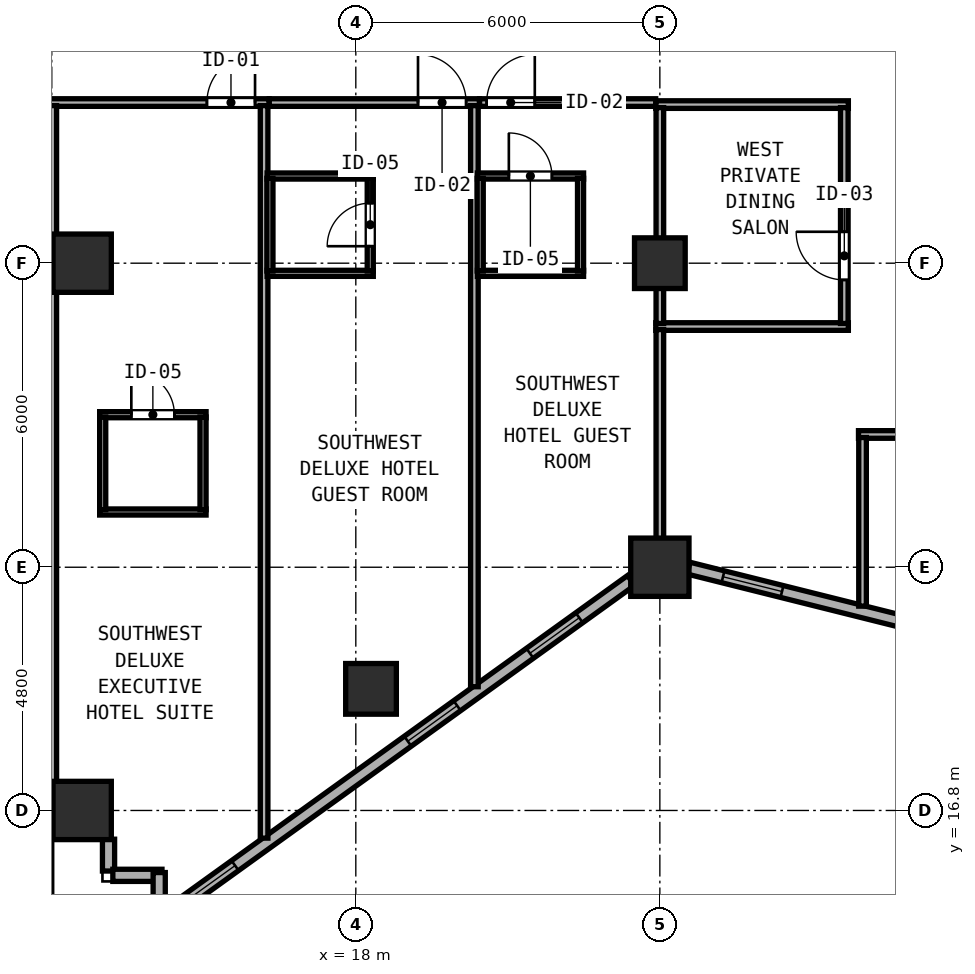
"""IFC4 building model, lengths in metres.
Left out: names, types, materials, properties, quantities, classifications, styles, units other than length and angle.
Written with IfcOpenShell. Run it as: python <this file> out.ifc"""

import sys

from ifc_helpers import new_model, si_unit, direction, frame, frame_2d, origin, origin_2d, place, context, subcontext, project, spatial, rectangle, hollow_rectangle, extrude, element, fill, save


model = new_model("IFC4")
c1 = context("Model", 3, precision=1e-05, world=origin(), true_north=direction((0.0, 1.0)))
c2 = subcontext(c1, "Body", "Model", "MODEL_VIEW")
j1 = project(units=[si_unit("LENGTHUNIT", "METRE"), si_unit("PLANEANGLEUNIT", "RADIAN")], contexts=[c1])
p1 = place(None, origin())
s1 = spatial("IfcSite", under=j1, at=p1, CompositionType="ELEMENT")
p2 = place(p1, origin())
s2 = spatial("IfcBuilding", under=s1, at=p2, CompositionType="ELEMENT")
p3 = place(p2, frame((0.0, 0.0, 81.8)))
s3 = spatial("IfcBuildingStorey", under=s2, at=p3, CompositionType="ELEMENT", Elevation=81.8)
for number, where, z_axis, x_axis in (
    (1, (24.0, 21.6, 0.0), (0.0, 0.0, 1.0), (1.0, 0.0, 0.0)),
    (2, (12.6, 16.8, 0.0), (0.0, 0.0, 1.0), (1.0, 0.0, 0.0)),
    (3, (12.6, 27.6, 0.0), (0.0, 0.0, 1.0), (1.0, 0.0, 0.0)),
):
    element("IfcColumn", number, at=place(p3, frame(where, z_axis=z_axis, x_axis=x_axis)), inside=s3, PredefinedType="COLUMN", context=c2, shape_type="SweptSolid", body=[
        extrude(hollow_rectangle(XDim=1.15, YDim=1.15, WallThickness=0.042, at=origin_2d()), origin(), (0.0, 0.0, 1.0), 3.8),
    ])
for number, where, z_axis, x_axis in (
    (4, (24.0, 27.6, 0.0), (0.0, 0.0, 1.0), (1.0, 0.0, 0.0)),
    (5, (18.3, 19.2, 0.0), (0.0, 0.0, 1.0), (1.0, 0.0, 0.0)),
):
    element("IfcColumn", number, at=place(p3, frame(where, z_axis=z_axis, x_axis=x_axis)), inside=s3, PredefinedType="COLUMN", context=c2, shape_type="SweptSolid", body=[
        extrude(hollow_rectangle(XDim=1.0, YDim=1.0, WallThickness=0.038, at=origin_2d()), origin(), (0.0, 0.0, 1.0), 3.8),
    ])
p4 = place(p3, frame((13.12, 16.233, 0.0), z_axis=(0.0, 0.0, 1.0), x_axis=(0.0, -1.0, 0.0)))
e6 = element("IfcWall", 6, at=p4, inside=s3, PredefinedType="SOLIDWALL", context=c2, shape_type="SweptSolid", body=[
    extrude(rectangle(XDim=0.628, YDim=0.24, at=frame_2d((0.314, 0.0))), origin(), (0.0, 0.0, 1.0), 3.6),
])
p5 = place(p3, frame((13.205, 15.52, 0.0), z_axis=(0.0, 0.0, 1.0), x_axis=(1.0, 0.0, 0.0)))
e7 = element("IfcWall", 7, at=p5, inside=s3, PredefinedType="SOLIDWALL", context=c2, shape_type="SweptSolid", body=[
    extrude(rectangle(XDim=0.97, YDim=0.24, at=frame_2d((0.485, 0.0))), origin(), (0.0, 0.0, 1.0), 3.6),
])
p6 = place(p3, frame((14.12, 15.575, 0.0), z_axis=(0.0, 0.0, 1.0), x_axis=(0.0, -1.0, 0.0)))
e8 = element("IfcWall", 8, at=p6, inside=s3, PredefinedType="SOLIDWALL", context=c2, shape_type="SweptSolid", body=[
    extrude(rectangle(XDim=0.996, YDim=0.24, at=frame_2d((0.498, 0.0))), origin(), (0.0, 0.0, 1.0), 3.6),
])
p7 = place(p3, frame((14.075, 14.602, 0.0), z_axis=(0.0, 0.0, 1.0), x_axis=(0.811543176492, 0.58429245476, 0.0)))
e9 = element("IfcWall", 9, at=p7, inside=s3, PredefinedType="SOLIDWALL", context=c2, shape_type="SweptSolid", body=[
    extrude(rectangle(XDim=11.531, YDim=0.24, at=frame_2d((5.765, 0.0))), origin(), (0.0, 0.0, 1.0), 3.097),
])
p8 = place(p7, frame((0.7, 0.0, 0.85)))
e10 = element("IfcOpeningElement", 10, at=p8, cuts=e9, PredefinedType="OPENING", context=c2, shape_type="SweptSolid", body=[
    extrude(rectangle(XDim=1.2, YDim=1.85, at=frame_2d((0.6, 0.925))), frame((0.0, 0.13, 0.0), z_axis=(0.0, -1.0, 0.0), x_axis=(1.0, 0.0, 0.0)), (0.0, 0.0, 1.0), 0.26),
])
p9 = place(p7, frame((6.1, 0.0, 0.85)))
e11 = element("IfcOpeningElement", 11, at=p9, cuts=e9, PredefinedType="OPENING", context=c2, shape_type="SweptSolid", body=[
    extrude(rectangle(XDim=1.2, YDim=1.85, at=frame_2d((0.6, 0.925))), frame((0.0, 0.13, 0.0), z_axis=(0.0, -1.0, 0.0), x_axis=(1.0, 0.0, 0.0)), (0.0, 0.0, 1.0), 0.26),
])
p10 = place(p7, frame((9.07, 0.0, 0.85)))
e12 = element("IfcOpeningElement", 12, at=p10, cuts=e9, PredefinedType="OPENING", context=c2, shape_type="SweptSolid", body=[
    extrude(rectangle(XDim=1.2, YDim=1.85, at=frame_2d((0.6, 0.925))), frame((0.0, 0.13, 0.0), z_axis=(0.0, -1.0, 0.0), x_axis=(1.0, 0.0, 0.0)), (0.0, 0.0, 1.0), 0.26),
])
p11 = place(p3, frame((24.567, 21.582, 0.0), z_axis=(0.0, 0.0, 1.0), x_axis=(0.970148978127, -0.24250971164, 0.0)))
e13 = element("IfcWall", 13, at=p11, inside=s3, PredefinedType="SOLIDWALL", context=c2, shape_type="SweptSolid", body=[
    extrude(rectangle(XDim=4.434, YDim=0.24, at=frame_2d((2.217, 0.0))), origin(), (0.0, 0.0, 1.0), 3.097),
])
p12 = place(p11, frame((0.7, 0.0, 0.85)))
e14 = element("IfcOpeningElement", 14, at=p12, cuts=e13, PredefinedType="OPENING", context=c2, shape_type="SweptSolid", body=[
    extrude(rectangle(XDim=1.2, YDim=1.85, at=frame_2d((0.6, 0.925))), frame((0.0, 0.13, 0.0), z_axis=(0.0, -1.0, 0.0), x_axis=(1.0, 0.0, 0.0)), (0.0, 0.0, 1.0), 0.26),
])
p13 = place(p3, frame((12.173, 33.524, 0.0), z_axis=(0.0, 0.0, 1.0), x_axis=(-0.963197271032, -0.268795493036, 0.0)))
e15 = element("IfcWall", 15, at=p13, inside=s3, PredefinedType="SOLIDWALL", context=c2, shape_type="SweptSolid", body=[
    extrude(rectangle(XDim=9.095, YDim=0.24, at=frame_2d((4.548, 0.0))), origin(), (0.0, 0.0, 1.0), 3.6),
])
p14 = place(p13, frame((0.7, 0.0, 0.85)))
e16 = element("IfcOpeningElement", 16, at=p14, cuts=e15, PredefinedType="OPENING", context=c2, shape_type="SweptSolid", body=[
    extrude(rectangle(XDim=1.2, YDim=1.85, at=frame_2d((0.6, 0.925))), frame((0.0, 0.13, 0.0), z_axis=(0.0, -1.0, 0.0), x_axis=(1.0, 0.0, 0.0)), (0.0, 0.0, 1.0), 0.26),
])
p15 = place(p13, frame((6.1, 0.0, 0.85)))
e17 = element("IfcOpeningElement", 17, at=p15, cuts=e15, PredefinedType="OPENING", context=c2, shape_type="SweptSolid", body=[
    extrude(rectangle(XDim=1.2, YDim=1.85, at=frame_2d((0.6, 0.925))), frame((0.0, 0.13, 0.0), z_axis=(0.0, -1.0, 0.0), x_axis=(1.0, 0.0, 0.0)), (0.0, 0.0, 1.0), 0.26),
])
for number, where, z_axis, x_axis in (
    (18, (23.92, 30.73, 0.0), (0.0, 0.0, 1.0), (1.0, 0.0, 0.0)),
    (19, (23.92, 26.35, 0.0), (0.0, 0.0, 1.0), (1.0, 0.0, 0.0)),
):
    element("IfcWall", number, at=place(p3, frame(where, z_axis=z_axis, x_axis=x_axis)), inside=s3, PredefinedType="PARTITIONING", context=c2, shape_type="SweptSolid", body=[
        extrude(rectangle(XDim=3.8, YDim=0.15, at=frame_2d((1.9, 0.0))), origin(), (0.0, 0.0, 1.0), 3.6),
    ])
p16 = place(p3, frame((24.0, 26.41, 0.0), z_axis=(0.0, 0.0, 1.0), x_axis=(0.0, 1.0, 0.0)))
e20 = element("IfcWall", 20, at=p16, inside=s3, PredefinedType="PARTITIONING", context=c2, shape_type="SweptSolid", body=[
    extrude(rectangle(XDim=4.26, YDim=0.15, at=frame_2d((2.13, 0.0))), origin(), (0.0, 0.0, 1.0), 3.097),
])
p17 = place(p3, frame((27.64, 26.41, 0.0), z_axis=(0.0, 0.0, 1.0), x_axis=(0.0, 1.0, 0.0)))
e21 = element("IfcWall", 21, at=p17, inside=s3, PredefinedType="PARTITIONING", context=c2, shape_type="SweptSolid", body=[
    extrude(rectangle(XDim=4.26, YDim=0.15, at=frame_2d((2.13, 0.0))), origin(), (0.0, 0.0, 1.0), 3.6),
])
p18 = place(p17, frame((1.81, 0.0, 0.0), z_axis=(0.0, 0.0, 1.0), x_axis=(-1.0, 0.0, 0.0)))
e22 = element("IfcOpeningElement", 22, at=p18, cuts=e21, PredefinedType="OPENING", context=c2, shape_type="SweptSolid", body=[
    extrude(rectangle(XDim=0.95, YDim=2.12, at=frame_2d((0.475, 1.06))), frame((0.0, 0.085, 0.0), z_axis=(0.0, -1.0, 0.0), x_axis=(1.0, 0.0, 0.0)), (0.0, 0.0, 1.0), 0.17),
])
p19 = place(p3, frame((27.92, 24.22, 0.0), z_axis=(0.0, 0.0, 1.0), x_axis=(1.0, 0.0, 0.0)))
e23 = element("IfcWall", 23, at=p19, inside=s3, PredefinedType="PARTITIONING", context=c2, shape_type="SweptSolid", body=[
    extrude(rectangle(XDim=7.36, YDim=0.15, at=frame_2d((3.68, 0.0))), origin(), (0.0, 0.0, 1.0), 3.6),
])
p20 = place(p19, frame((4.075, 0.0, 0.0), z_axis=(0.0, 0.0, 1.0), x_axis=(-1.0, 0.0, 0.0)))
e24 = element("IfcOpeningElement", 24, at=p20, cuts=e23, PredefinedType="OPENING", context=c2, shape_type="SweptSolid", body=[
    extrude(rectangle(XDim=0.95, YDim=2.12, at=frame_2d((0.475, 1.06))), frame((0.0, 0.085, 0.0), z_axis=(0.0, -1.0, 0.0), x_axis=(1.0, 0.0, 0.0)), (0.0, 0.0, 1.0), 0.17),
])
p21 = place(p3, frame((28.0, 20.832, 0.0), z_axis=(0.0, 0.0, 1.0), x_axis=(0.0, 1.0, 0.0)))
e25 = element("IfcWall", 25, at=p21, inside=s3, PredefinedType="PARTITIONING", context=c2, shape_type="SweptSolid", body=[
    extrude(rectangle(XDim=3.328, YDim=0.15, at=frame_2d((1.664, 0.0))), origin(), (0.0, 0.0, 1.0), 3.6),
])
p22 = place(p3, frame((11.7, 30.77, 0.0), z_axis=(0.0, 0.0, 1.0), x_axis=(1.0, 0.0, 0.0)))
e26 = element("IfcWall", 26, at=p22, inside=s3, PredefinedType="PARTITIONING", context=c2, shape_type="SweptSolid", body=[
    extrude(rectangle(XDim=4.59, YDim=0.15, at=frame_2d((2.295, 0.0))), origin(), (0.0, 0.0, 1.0), 3.6),
])
p23 = place(p22, frame((4.311, 0.0, 0.0), z_axis=(0.0, 0.0, 1.0), x_axis=(-1.0, 0.0, 0.0)))
e27 = element("IfcOpeningElement", 27, at=p23, cuts=e26, PredefinedType="OPENING", context=c2, shape_type="SweptSolid", body=[
    extrude(rectangle(XDim=0.95, YDim=2.18, at=frame_2d((0.475, 1.09))), frame((0.0, 0.085, 0.0), z_axis=(0.0, -1.0, 0.0), x_axis=(1.0, 0.0, 0.0)), (0.0, 0.0, 1.0), 0.17),
])
p24 = place(p3, frame((16.19, 16.254, 0.0), z_axis=(0.0, 0.0, 1.0), x_axis=(0.0, 1.0, 0.0)))
e28 = element("IfcWall", 28, at=p24, inside=s3, PredefinedType="PARTITIONING", context=c2, shape_type="SweptSolid", body=[
    extrude(rectangle(XDim=14.456, YDim=0.15, at=frame_2d((7.228, 0.0))), origin(), (0.0, 0.0, 1.0), 3.6),
])
p25 = place(p3, frame((12.945, 24.61, 0.0), z_axis=(0.0, 0.0, 1.0), x_axis=(1.0, 0.0, 0.0)))
e29 = element("IfcWall", 29, at=p25, inside=s3, PredefinedType="PARTITIONING", context=c2, shape_type="SweptSolid", body=[
    extrude(rectangle(XDim=2.1, YDim=0.12, at=frame_2d((1.05, 0.0))), origin(), (0.0, 0.0, 1.0), 3.6),
])
p26 = place(p25, frame((1.475, 0.0, 0.0), z_axis=(0.0, 0.0, 1.0), x_axis=(-1.0, 0.0, 0.0)))
e30 = element("IfcOpeningElement", 30, at=p26, cuts=e29, PredefinedType="OPENING", context=c2, shape_type="SweptSolid", body=[
    extrude(rectangle(XDim=0.85, YDim=2.1, at=frame_2d((0.425, 1.05))), frame((0.0, 0.07, 0.0), z_axis=(0.0, -1.0, 0.0), x_axis=(1.0, 0.0, 0.0)), (0.0, 0.0, 1.0), 0.14),
])
p27 = place(p3, frame((12.945, 22.69, 0.0), z_axis=(0.0, 0.0, 1.0), x_axis=(1.0, 0.0, 0.0)))
e31 = element("IfcWall", 31, at=p27, inside=s3, PredefinedType="PARTITIONING", context=c2, shape_type="SweptSolid", body=[
    extrude(rectangle(XDim=2.1, YDim=0.12, at=frame_2d((1.05, 0.0))), origin(), (0.0, 0.0, 1.0), 3.6),
])
for number, where, z_axis, x_axis in (
    (32, (13.005, 22.735, 0.0), (0.0, 0.0, 1.0), (0.0, 1.0, 0.0)),
    (33, (14.985, 22.735, 0.0), (0.0, 0.0, 1.0), (0.0, 1.0, 0.0)),
):
    element("IfcWall", number, at=place(p3, frame(where, z_axis=z_axis, x_axis=x_axis)), inside=s3, PredefinedType="PARTITIONING", context=c2, shape_type="SweptSolid", body=[
        extrude(rectangle(XDim=1.83, YDim=0.12, at=frame_2d((0.915, 0.0))), origin(), (0.0, 0.0, 1.0), 3.6),
    ])
p28 = place(p3, frame((16.292, 30.77, 0.0), z_axis=(0.0, 0.0, 1.0), x_axis=(1.0, 0.0, 0.0)))
e34 = element("IfcWall", 34, at=p28, inside=s3, PredefinedType="PARTITIONING", context=c2, shape_type="SweptSolid", body=[
    extrude(rectangle(XDim=4.148, YDim=0.15, at=frame_2d((2.074, 0.0))), origin(), (0.0, 0.0, 1.0), 3.6),
])
p29 = place(p28, frame((3.885, 0.0, 0.0), z_axis=(0.0, 0.0, 1.0), x_axis=(-1.0, 0.0, 0.0)))
e35 = element("IfcOpeningElement", 35, at=p29, cuts=e34, PredefinedType="OPENING", context=c2, shape_type="SweptSolid", body=[
    extrude(rectangle(XDim=0.95, YDim=2.15, at=frame_2d((0.475, 1.075))), frame((0.0, 0.085, 0.0), z_axis=(0.0, -1.0, 0.0), x_axis=(1.0, 0.0, 0.0)), (0.0, 0.0, 1.0), 0.17),
])
p30 = place(p3, frame((20.34, 19.242, 0.0), z_axis=(0.0, 0.0, 1.0), x_axis=(0.0, 1.0, 0.0)))
e36 = element("IfcWall", 36, at=p30, inside=s3, PredefinedType="PARTITIONING", context=c2, shape_type="SweptSolid", body=[
    extrude(rectangle(XDim=11.468, YDim=0.15, at=frame_2d((5.734, 0.0))), origin(), (0.0, 0.0, 1.0), 3.6),
])
p31 = place(p3, frame((16.25, 29.32, 0.0), z_axis=(0.0, 0.0, 1.0), x_axis=(1.0, 0.0, 0.0)))
e37 = element("IfcWall", 37, at=p31, inside=s3, PredefinedType="PARTITIONING", context=c2, shape_type="SweptSolid", body=[
    extrude(rectangle(XDim=2.095, YDim=0.12, at=frame_2d((1.047, 0.0))), origin(), (0.0, 0.0, 1.0), 3.6),
])
p32 = place(p3, frame((16.25, 27.4, 0.0), z_axis=(0.0, 0.0, 1.0), x_axis=(1.0, 0.0, 0.0)))
e38 = element("IfcWall", 38, at=p32, inside=s3, PredefinedType="PARTITIONING", context=c2, shape_type="SweptSolid", body=[
    extrude(rectangle(XDim=2.095, YDim=0.12, at=frame_2d((1.047, 0.0))), origin(), (0.0, 0.0, 1.0), 3.097),
])
p33 = place(p3, frame((16.305, 27.445, 0.0), z_axis=(0.0, 0.0, 1.0), x_axis=(0.0, 1.0, 0.0)))
e39 = element("IfcWall", 39, at=p33, inside=s3, PredefinedType="PARTITIONING", context=c2, shape_type="SweptSolid", body=[
    extrude(rectangle(XDim=1.83, YDim=0.12, at=frame_2d((0.915, 0.0))), origin(), (0.0, 0.0, 1.0), 3.6),
])
p34 = place(p3, frame((18.285, 27.445, 0.0), z_axis=(0.0, 0.0, 1.0), x_axis=(0.0, 1.0, 0.0)))
e40 = element("IfcWall", 40, at=p34, inside=s3, PredefinedType="PARTITIONING", context=c2, shape_type="SweptSolid", body=[
    extrude(rectangle(XDim=1.83, YDim=0.12, at=frame_2d((0.915, 0.0))), origin(), (0.0, 0.0, 1.0), 3.6),
])
p35 = place(p34, frame((0.49, 0.0, 0.0)))
e41 = element("IfcOpeningElement", 41, at=p35, cuts=e40, PredefinedType="OPENING", context=c2, shape_type="SweptSolid", body=[
    extrude(rectangle(XDim=0.85, YDim=2.1, at=frame_2d((0.425, 1.05))), frame((0.0, 0.07, 0.0), z_axis=(0.0, -1.0, 0.0), x_axis=(1.0, 0.0, 0.0)), (0.0, 0.0, 1.0), 0.14),
])
p36 = place(p3, frame((20.442, 30.77, 0.0), z_axis=(0.0, 0.0, 1.0), x_axis=(1.0, 0.0, 0.0)))
e42 = element("IfcWall", 42, at=p36, inside=s3, PredefinedType="PARTITIONING", context=c2, shape_type="SweptSolid", body=[
    extrude(rectangle(XDim=3.476, YDim=0.15, at=frame_2d((1.738, 0.0))), origin(), (0.0, 0.0, 1.0), 3.6),
])
p37 = place(p36, frame((1.09, 0.0, 0.0), z_axis=(0.0, 0.0, 1.0), x_axis=(-1.0, 0.0, 0.0)))
e43 = element("IfcOpeningElement", 43, at=p37, cuts=e42, PredefinedType="OPENING", context=c2, shape_type="SweptSolid", body=[
    extrude(rectangle(XDim=0.95, YDim=2.15, at=frame_2d((0.475, 1.075))), frame((0.0, 0.085, 0.0), z_axis=(0.0, -1.0, 0.0), x_axis=(1.0, 0.0, 0.0)), (0.0, 0.0, 1.0), 0.17),
])
p38 = place(p3, frame((24.0, 21.819, 0.0), z_axis=(0.0, 0.0, 1.0), x_axis=(0.0, 1.0, 0.0)))
e44 = element("IfcWall", 44, at=p38, inside=s3, PredefinedType="PARTITIONING", context=c2, shape_type="SweptSolid", body=[
    extrude(rectangle(XDim=4.471, YDim=0.15, at=frame_2d((2.236, 0.0))), origin(), (0.0, 0.0, 1.0), 3.097),
])
p39 = place(p3, frame((20.4, 29.32, 0.0), z_axis=(0.0, 0.0, 1.0), x_axis=(1.0, 0.0, 0.0)))
e45 = element("IfcWall", 45, at=p39, inside=s3, PredefinedType="PARTITIONING", context=c2, shape_type="SweptSolid", body=[
    extrude(rectangle(XDim=2.095, YDim=0.12, at=frame_2d((1.048, 0.0))), origin(), (0.0, 0.0, 1.0), 3.6),
])
p40 = place(p39, frame((1.47, 0.0, 0.0), z_axis=(0.0, 0.0, 1.0), x_axis=(-1.0, 0.0, 0.0)))
e46 = element("IfcOpeningElement", 46, at=p40, cuts=e45, PredefinedType="OPENING", context=c2, shape_type="SweptSolid", body=[
    extrude(rectangle(XDim=0.85, YDim=2.1, at=frame_2d((0.425, 1.05))), frame((0.0, 0.07, 0.0), z_axis=(0.0, -1.0, 0.0), x_axis=(1.0, 0.0, 0.0)), (0.0, 0.0, 1.0), 0.14),
])
p41 = place(p3, frame((20.4, 27.4, 0.0), z_axis=(0.0, 0.0, 1.0), x_axis=(1.0, 0.0, 0.0)))
e47 = element("IfcWall", 47, at=p41, inside=s3, PredefinedType="PARTITIONING", context=c2, shape_type="SweptSolid", body=[
    extrude(rectangle(XDim=2.095, YDim=0.12, at=frame_2d((1.048, 0.0))), origin(), (0.0, 0.0, 1.0), 3.097),
])
for number, where, z_axis, x_axis in (
    (48, (20.455, 27.445, 0.0), (0.0, 0.0, 1.0), (0.0, 1.0, 0.0)),
    (49, (22.435, 27.445, 0.0), (0.0, 0.0, 1.0), (0.0, 1.0, 0.0)),
):
    element("IfcWall", number, at=place(p3, frame(where, z_axis=z_axis, x_axis=x_axis)), inside=s3, PredefinedType="PARTITIONING", context=c2, shape_type="SweptSolid", body=[
        extrude(rectangle(XDim=1.83, YDim=0.12, at=frame_2d((0.915, 0.0))), origin(), (0.0, 0.0, 1.0), 3.6),
    ])
p42 = place(p3, frame((12.02, 16.612, 0.0), z_axis=(0.0, 0.0, 1.0), x_axis=(0.0, 1.0, 0.0)))
e50 = element("IfcWall", 50, at=p42, inside=s3, PredefinedType="PARTITIONING", context=c2, shape_type="SweptSolid", body=[
    extrude(rectangle(XDim=14.098, YDim=0.15, at=frame_2d((7.049, 0.0))), origin(), (0.0, 0.0, 1.0), 3.6),
])
p43 = place(p8, origin())
e51 = element("IfcWindow", 51, at=p43, inside=s3, PartitioningType="SINGLE_PANEL", PredefinedType="WINDOW", context=c2, shape_type="SweptSolid", body=[
    extrude(rectangle(XDim=1.2, YDim=1.85, at=frame_2d((0.6, 0.925))), frame((0.0, 0.03, 0.0), z_axis=(0.0, -1.0, 0.0), x_axis=(1.0, 0.0, 0.0)), (0.0, 0.0, 1.0), 0.06),
])
fill(e10, e51)
p44 = place(p9, origin())
e52 = element("IfcWindow", 52, at=p44, inside=s3, PartitioningType="SINGLE_PANEL", PredefinedType="WINDOW", context=c2, shape_type="SweptSolid", body=[
    extrude(rectangle(XDim=1.2, YDim=1.85, at=frame_2d((0.6, 0.925))), frame((0.0, 0.03, 0.0), z_axis=(0.0, -1.0, 0.0), x_axis=(1.0, 0.0, 0.0)), (0.0, 0.0, 1.0), 0.06),
])
fill(e11, e52)
p45 = place(p12, origin())
e53 = element("IfcWindow", 53, at=p45, inside=s3, PartitioningType="SINGLE_PANEL", PredefinedType="WINDOW", context=c2, shape_type="SweptSolid", body=[
    extrude(rectangle(XDim=1.2, YDim=1.85, at=frame_2d((0.6, 0.925))), frame((0.0, 0.03, 0.0), z_axis=(0.0, -1.0, 0.0), x_axis=(1.0, 0.0, 0.0)), (0.0, 0.0, 1.0), 0.06),
])
fill(e14, e53)
p46 = place(p18, origin())
e54 = element("IfcDoor", 54, at=p46, inside=s3, OperationType="SINGLE_SWING_LEFT", PredefinedType="DOOR", context=c2, shape_type="SweptSolid", body=[
    extrude(rectangle(XDim=0.95, YDim=2.12, at=frame_2d((0.475, 1.06))), frame((0.0, 0.025, 0.0), z_axis=(0.0, -1.0, 0.0), x_axis=(1.0, 0.0, 0.0)), (0.0, 0.0, 1.0), 0.05),
])
fill(e22, e54)
p47 = place(p23, origin())
e55 = element("IfcDoor", 55, at=p47, inside=s3, OperationType="SINGLE_SWING_LEFT", PredefinedType="DOOR", context=c2, shape_type="SweptSolid", body=[
    extrude(rectangle(XDim=0.95, YDim=2.18, at=frame_2d((0.475, 1.09))), frame((0.0, 0.025, 0.0), z_axis=(0.0, -1.0, 0.0), x_axis=(1.0, 0.0, 0.0)), (0.0, 0.0, 1.0), 0.05),
])
fill(e27, e55)
p48 = place(p26, origin())
e56 = element("IfcDoor", 56, at=p48, inside=s3, OperationType="SINGLE_SWING_RIGHT", PredefinedType="DOOR", context=c2, shape_type="SweptSolid", body=[
    extrude(rectangle(XDim=0.85, YDim=2.1, at=frame_2d((0.425, 1.05))), frame((0.0, 0.025, 0.0), z_axis=(0.0, -1.0, 0.0), x_axis=(1.0, 0.0, 0.0)), (0.0, 0.0, 1.0), 0.05),
])
fill(e30, e56)
p49 = place(p29, origin())
e57 = element("IfcDoor", 57, at=p49, inside=s3, OperationType="SINGLE_SWING_RIGHT", PredefinedType="DOOR", context=c2, shape_type="SweptSolid", body=[
    extrude(rectangle(XDim=0.95, YDim=2.15, at=frame_2d((0.475, 1.075))), frame((0.0, 0.025, 0.0), z_axis=(0.0, -1.0, 0.0), x_axis=(1.0, 0.0, 0.0)), (0.0, 0.0, 1.0), 0.05),
])
fill(e35, e57)
p50 = place(p35, origin())
e58 = element("IfcDoor", 58, at=p50, inside=s3, OperationType="SINGLE_SWING_LEFT", PredefinedType="DOOR", context=c2, shape_type="SweptSolid", body=[
    extrude(rectangle(XDim=0.85, YDim=2.1, at=frame_2d((0.425, 1.05))), frame((0.0, 0.025, 0.0), z_axis=(0.0, -1.0, 0.0), x_axis=(1.0, 0.0, 0.0)), (0.0, 0.0, 1.0), 0.05),
])
fill(e41, e58)
p51 = place(p37, origin())
e59 = element("IfcDoor", 59, at=p51, inside=s3, OperationType="SINGLE_SWING_LEFT", PredefinedType="DOOR", context=c2, shape_type="SweptSolid", body=[
    extrude(rectangle(XDim=0.95, YDim=2.15, at=frame_2d((0.475, 1.075))), frame((0.0, 0.025, 0.0), z_axis=(0.0, -1.0, 0.0), x_axis=(1.0, 0.0, 0.0)), (0.0, 0.0, 1.0), 0.05),
])
fill(e43, e59)
p52 = place(p40, origin())
e60 = element("IfcDoor", 60, at=p52, inside=s3, OperationType="SINGLE_SWING_RIGHT", PredefinedType="DOOR", context=c2, shape_type="SweptSolid", body=[
    extrude(rectangle(XDim=0.85, YDim=2.1, at=frame_2d((0.425, 1.05))), frame((0.0, 0.025, 0.0), z_axis=(0.0, -1.0, 0.0), x_axis=(1.0, 0.0, 0.0)), (0.0, 0.0, 1.0), 0.05),
])
fill(e46, e60)
p53 = place(p10, origin())
e61 = element("IfcWindow", 61, at=p53, inside=s3, PartitioningType="SINGLE_PANEL", PredefinedType="WINDOW", context=c2, shape_type="SweptSolid", body=[
    extrude(rectangle(XDim=1.2, YDim=1.85, at=frame_2d((0.6, 0.925))), frame((0.0, 0.03, 0.0), z_axis=(0.0, -1.0, 0.0), x_axis=(1.0, 0.0, 0.0)), (0.0, 0.0, 1.0), 0.06),
])
fill(e12, e61)
save(model, sys.argv[1])
